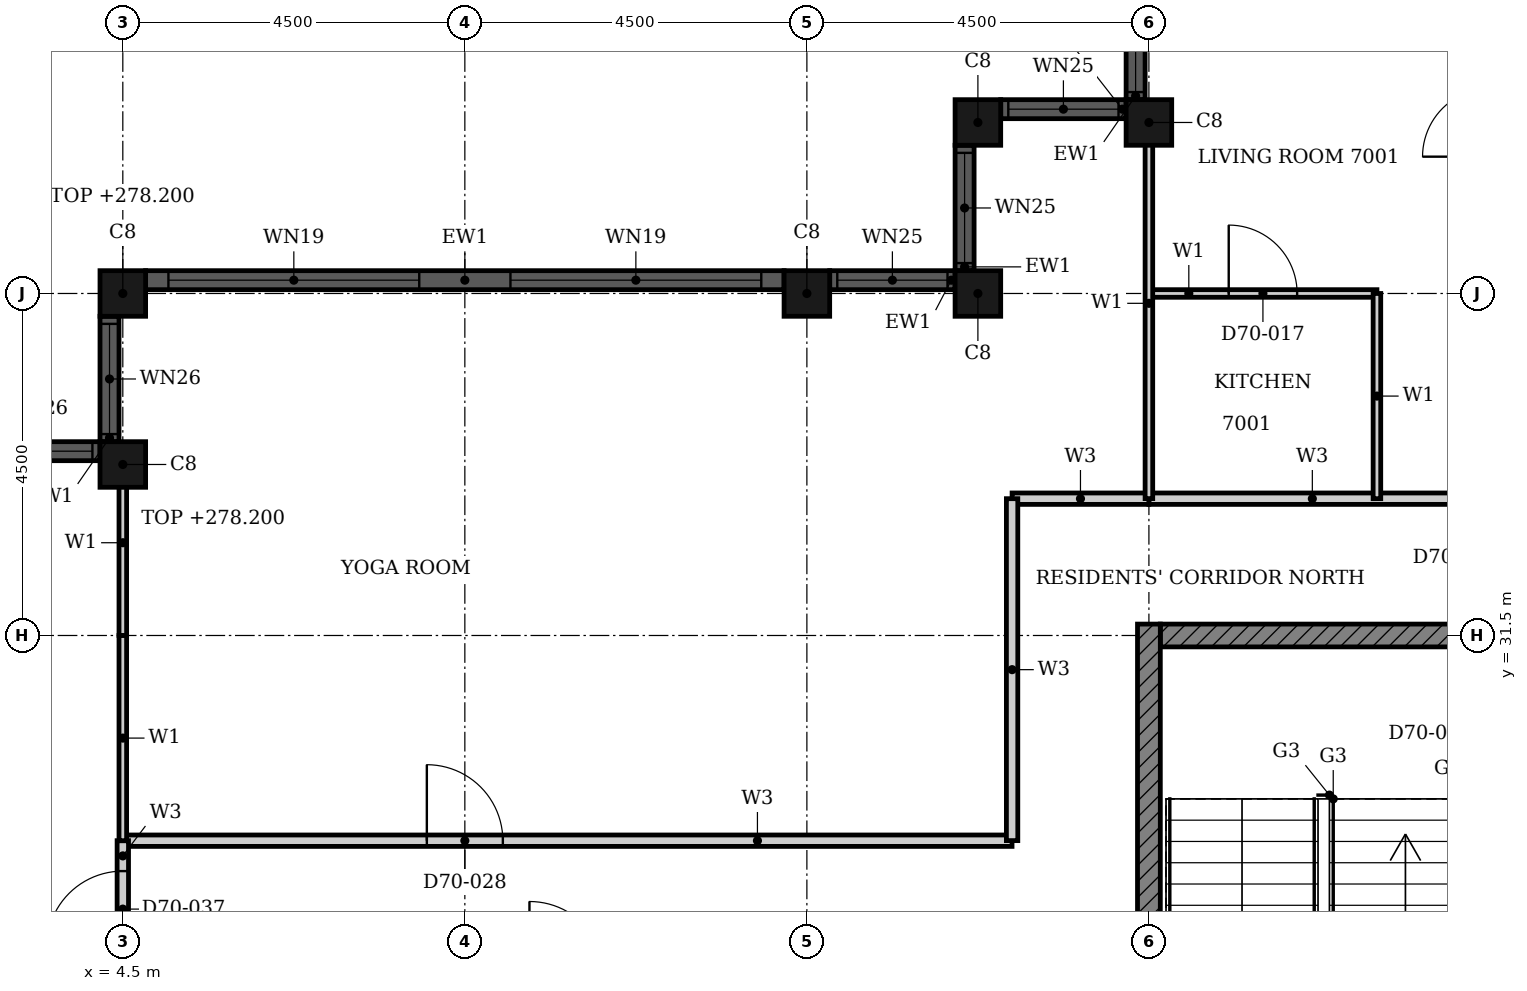
"""IFC4 building model, lengths in metres.
Left out: names, types, materials, properties, quantities, classifications, styles, units other than length and angle.
Written with IfcOpenShell. Run it as: python <this file> out.ifc"""

import sys

from ifc_helpers import new_model, si_unit, direction, frame, frame_2d, origin, origin_2d, place, context, subcontext, project, spatial, rectangle, hollow_rectangle, extrude, element, fill, save


model = new_model("IFC4")
c1 = context("Model", 3, precision=1e-05, world=origin(), true_north=direction((0.0, 1.0)))
c2 = subcontext(c1, "Body", "Model", "MODEL_VIEW")
j1 = project(units=[si_unit("LENGTHUNIT", "METRE"), si_unit("PLANEANGLEUNIT", "RADIAN")], contexts=[c1])
p1 = place(None, origin())
s1 = spatial("IfcSite", under=j1, at=p1, CompositionType="ELEMENT")
p2 = place(p1, origin())
s2 = spatial("IfcBuilding", under=s1, at=p2, CompositionType="ELEMENT")
p3 = place(p2, frame((0.0, 0.0, 274.9)))
s3 = spatial("IfcBuildingStorey", under=s2, at=p3, CompositionType="ELEMENT", Elevation=274.9)
for number, where, z_axis, x_axis in (
    (1, (18.0, 38.25, 0.0), (0.0, 0.0, 1.0), (1.0, 0.0, 0.0)),
    (2, (15.75, 38.25, 0.0), (0.0, 0.0, 1.0), (1.0, 0.0, 0.0)),
    (3, (15.75, 36.0, 0.0), (0.0, 0.0, 1.0), (1.0, 0.0, 0.0)),
    (4, (13.5, 36.0, 0.0), (0.0, 0.0, 1.0), (1.0, 0.0, 0.0)),
):
    element("IfcColumn", number, at=place(p3, frame(where, z_axis=z_axis, x_axis=x_axis)), inside=s3, PredefinedType="COLUMN", context=c2, shape_type="SweptSolid", body=[
        extrude(hollow_rectangle(XDim=0.6, YDim=0.6, WallThickness=0.02, at=origin_2d()), origin(), (0.0, 0.0, 1.0), 3.7),
    ])
for number, where, z_axis, x_axis in (
    (5, (4.5, 36.0, 0.0), (0.0, 0.0, 1.0), (1.0, 0.0, 0.0)),
    (6, (4.5, 33.75, 0.0), (0.0, 0.0, 1.0), (1.0, 0.0, 0.0)),
):
    element("IfcColumn", number, at=place(p3, frame(where, z_axis=z_axis, x_axis=x_axis)), inside=s3, PredefinedType="COLUMN", context=c2, shape_type="SweptSolid", body=[
        extrude(hollow_rectangle(XDim=0.6, YDim=0.6, WallThickness=0.02, at=origin_2d()), origin(), (0.0, 0.0, 1.0), 3.3),
    ])
p4 = place(p3, frame((17.825, 40.2, 0.0), z_axis=(0.0, 0.0, 1.0), x_axis=(0.0, -1.0, 0.0)))
e7 = element("IfcWall", 7, at=p4, inside=s3, PredefinedType="SOLIDWALL", context=c2, shape_type="SweptSolid", body=[
    extrude(rectangle(XDim=1.65, YDim=0.25, at=frame_2d((0.825, 0.0))), origin(), (0.0, 0.0, 1.0), 3.7),
])
p5 = place(p4, frame((0.1, 0.0, 0.9)))
e8 = element("IfcOpeningElement", 8, at=p5, cuts=e7, PredefinedType="OPENING", context=c2, shape_type="SweptSolid", body=[
    extrude(rectangle(XDim=1.45, YDim=1.85, at=frame_2d((0.725, 0.925))), frame((0.0, 0.135, 0.0), z_axis=(0.0, -1.0, 0.0), x_axis=(1.0, 0.0, 0.0)), (0.0, 0.0, 1.0), 0.27),
])
p6 = place(p3, frame((17.7, 38.425, 0.0), z_axis=(0.0, 0.0, 1.0), x_axis=(-1.0, 0.0, 0.0)))
e9 = element("IfcWall", 9, at=p6, inside=s3, PredefinedType="SOLIDWALL", context=c2, shape_type="SweptSolid", body=[
    extrude(rectangle(XDim=1.65, YDim=0.25, at=frame_2d((0.825, 0.0))), origin(), (0.0, 0.0, 1.0), 3.7),
])
p7 = place(p6, frame((0.1, 0.0, 0.9)))
e10 = element("IfcOpeningElement", 10, at=p7, cuts=e9, PredefinedType="OPENING", context=c2, shape_type="SweptSolid", body=[
    extrude(rectangle(XDim=1.45, YDim=1.85, at=frame_2d((0.725, 0.925))), frame((0.0, 0.135, 0.0), z_axis=(0.0, -1.0, 0.0), x_axis=(1.0, 0.0, 0.0)), (0.0, 0.0, 1.0), 0.27),
])
p8 = place(p3, frame((15.575, 37.95, 0.0), z_axis=(0.0, 0.0, 1.0), x_axis=(0.0, -1.0, 0.0)))
e11 = element("IfcWall", 11, at=p8, inside=s3, PredefinedType="SOLIDWALL", context=c2, shape_type="SweptSolid", body=[
    extrude(rectangle(XDim=1.65, YDim=0.25, at=frame_2d((0.825, 0.0))), origin(), (0.0, 0.0, 1.0), 3.7),
])
p9 = place(p8, frame((0.1, 0.0, 0.9)))
e12 = element("IfcOpeningElement", 12, at=p9, cuts=e11, PredefinedType="OPENING", context=c2, shape_type="SweptSolid", body=[
    extrude(rectangle(XDim=1.45, YDim=1.85, at=frame_2d((0.725, 0.925))), frame((0.0, 0.135, 0.0), z_axis=(0.0, -1.0, 0.0), x_axis=(1.0, 0.0, 0.0)), (0.0, 0.0, 1.0), 0.27),
])
p10 = place(p3, frame((15.45, 36.175, 0.0), z_axis=(0.0, 0.0, 1.0), x_axis=(-1.0, 0.0, 0.0)))
e13 = element("IfcWall", 13, at=p10, inside=s3, PredefinedType="SOLIDWALL", context=c2, shape_type="SweptSolid", body=[
    extrude(rectangle(XDim=1.65, YDim=0.25, at=frame_2d((0.825, 0.0))), origin(), (0.0, 0.0, 1.0), 3.7),
])
p11 = place(p10, frame((0.1, 0.0, 0.9)))
e14 = element("IfcOpeningElement", 14, at=p11, cuts=e13, PredefinedType="OPENING", context=c2, shape_type="SweptSolid", body=[
    extrude(rectangle(XDim=1.45, YDim=1.85, at=frame_2d((0.725, 0.925))), frame((0.0, 0.135, 0.0), z_axis=(0.0, -1.0, 0.0), x_axis=(1.0, 0.0, 0.0)), (0.0, 0.0, 1.0), 0.27),
])
p12 = place(p3, frame((13.2, 36.175, 0.0), z_axis=(0.0, 0.0, 1.0), x_axis=(-1.0, 0.0, 0.0)))
e15 = element("IfcWall", 15, at=p12, inside=s3, PredefinedType="SOLIDWALL", context=c2, shape_type="SweptSolid", body=[
    extrude(rectangle(XDim=8.4, YDim=0.25, at=frame_2d((4.2, 0.0))), origin(), (0.0, 0.0, 1.0), 3.7),
])
p13 = place(p12, frame((0.3, 0.0, 0.45)))
e16 = element("IfcOpeningElement", 16, at=p13, cuts=e15, PredefinedType="OPENING", context=c2, shape_type="SweptSolid", body=[
    extrude(rectangle(XDim=3.3, YDim=2.2, at=frame_2d((1.65, 1.1))), frame((0.0, 0.135, 0.0), z_axis=(0.0, -1.0, 0.0), x_axis=(1.0, 0.0, 0.0)), (0.0, 0.0, 1.0), 0.27),
])
p14 = place(p12, frame((4.8, 0.0, 0.45)))
e17 = element("IfcOpeningElement", 17, at=p14, cuts=e15, PredefinedType="OPENING", context=c2, shape_type="SweptSolid", body=[
    extrude(rectangle(XDim=3.3, YDim=2.2, at=frame_2d((1.65, 1.1))), frame((0.0, 0.135, 0.0), z_axis=(0.0, -1.0, 0.0), x_axis=(1.0, 0.0, 0.0)), (0.0, 0.0, 1.0), 0.27),
])
p15 = place(p3, frame((4.325, 35.7, 0.0), z_axis=(0.0, 0.0, 1.0), x_axis=(0.0, -1.0, 0.0)))
e18 = element("IfcWall", 18, at=p15, inside=s3, PredefinedType="SOLIDWALL", context=c2, shape_type="SweptSolid", body=[
    extrude(rectangle(XDim=1.65, YDim=0.25, at=frame_2d((0.825, 0.0))), origin(), (0.0, 0.0, 1.0), 3.7),
])
p16 = place(p15, frame((0.1, 0.0, 0.9)))
e19 = element("IfcOpeningElement", 19, at=p16, cuts=e18, PredefinedType="OPENING", context=c2, shape_type="SweptSolid", body=[
    extrude(rectangle(XDim=1.45, YDim=1.75, at=frame_2d((0.725, 0.875))), frame((0.0, 0.135, 0.0), z_axis=(0.0, -1.0, 0.0), x_axis=(1.0, 0.0, 0.0)), (0.0, 0.0, 1.0), 0.27),
])
p17 = place(p3, frame((4.2, 33.925, 0.0), z_axis=(0.0, 0.0, 1.0), x_axis=(-1.0, 0.0, 0.0)))
e20 = element("IfcWall", 20, at=p17, inside=s3, PredefinedType="SOLIDWALL", context=c2, shape_type="SweptSolid", body=[
    extrude(rectangle(XDim=1.65, YDim=0.25, at=frame_2d((0.825, 0.0))), origin(), (0.0, 0.0, 1.0), 3.7),
])
p18 = place(p17, frame((0.1, 0.0, 0.9)))
e21 = element("IfcOpeningElement", 21, at=p18, cuts=e20, PredefinedType="OPENING", context=c2, shape_type="SweptSolid", body=[
    extrude(rectangle(XDim=1.45, YDim=1.75, at=frame_2d((0.725, 0.875))), frame((0.0, 0.135, 0.0), z_axis=(0.0, -1.0, 0.0), x_axis=(1.0, 0.0, 0.0)), (0.0, 0.0, 1.0), 0.27),
])
p19 = place(p3, frame((18.15, 31.5, 0.0), z_axis=(0.0, 0.0, 1.0), x_axis=(1.0, 0.0, 0.0)))
e22 = element("IfcWall", 22, at=p19, inside=s3, PredefinedType="SHEAR", context=c2, shape_type="SweptSolid", body=[
    extrude(rectangle(XDim=9.368, YDim=0.3, at=frame_2d((4.684, 0.0))), origin(), (0.0, 0.0, 1.0), 3.3),
])
p20 = place(p19, frame((4.736, 0.0, 0.0)))
e23 = element("IfcOpeningElement", 23, at=p20, cuts=e22, PredefinedType="OPENING", context=c2, shape_type="SweptSolid", body=[
    extrude(rectangle(XDim=1.8, YDim=2.1, at=frame_2d((0.9, 1.05))), frame((0.0, 0.16, 0.0), z_axis=(0.0, -1.0, 0.0), x_axis=(1.0, 0.0, 0.0)), (0.0, 0.0, 1.0), 0.32),
])
p21 = place(p3, frame((18.0, 22.35, 0.0), z_axis=(0.0, 0.0, 1.0), x_axis=(0.0, 1.0, 0.0)))
e24 = element("IfcWall", 24, at=p21, inside=s3, PredefinedType="SHEAR", context=c2, shape_type="SweptSolid", body=[
    extrude(rectangle(XDim=9.3, YDim=0.3, at=frame_2d((4.65, 0.0))), origin(), (0.0, 0.0, 1.0), 3.3),
])
p22 = place(p3, frame((4.5, 28.8, 0.0), z_axis=(0.0, 0.0, 1.0), x_axis=(1.0, 0.0, 0.0)))
e25 = element("IfcWall", 25, at=p22, inside=s3, PredefinedType="PARTITIONING", context=c2, shape_type="SweptSolid", body=[
    extrude(rectangle(XDim=11.699, YDim=0.15, at=frame_2d((5.85, 0.0))), origin(), (0.0, 0.0, 1.0), 3.3),
])
p23 = place(p22, frame((4.0, 0.0, 0.0)))
e26 = element("IfcOpeningElement", 26, at=p23, cuts=e25, PredefinedType="OPENING", context=c2, shape_type="SweptSolid", body=[
    extrude(rectangle(XDim=1.0, YDim=2.1, at=frame_2d((0.5, 1.05))), frame((0.0, 0.085, 0.0), z_axis=(0.0, -1.0, 0.0), x_axis=(1.0, 0.0, 0.0)), (0.0, 0.0, 1.0), 0.17),
])
p24 = place(p3, frame((18.0, 33.3, 0.0), z_axis=(0.0, 0.0, 1.0), x_axis=(1.0, 0.0, 0.0)))
e27 = element("IfcWall", 27, at=p24, inside=s3, PredefinedType="PARTITIONING", context=c2, shape_type="SweptSolid", body=[
    extrude(rectangle(XDim=6.6, YDim=0.15, at=frame_2d((3.3, 0.0))), origin(), (0.0, 0.0, 1.0), 3.3),
])
p25 = place(p24, frame((4.3, 0.0, 0.0)))
e28 = element("IfcOpeningElement", 28, at=p25, cuts=e27, PredefinedType="OPENING", context=c2, shape_type="SweptSolid", body=[
    extrude(rectangle(XDim=1.0, YDim=2.2, at=frame_2d((0.5, 1.1))), frame((0.0, 0.085, 0.0), z_axis=(0.0, -1.0, 0.0), x_axis=(1.0, 0.0, 0.0)), (0.0, 0.0, 1.0), 0.17),
])
p26 = place(p3, frame((16.2, 33.3, 0.0), z_axis=(0.0, 0.0, 1.0), x_axis=(1.0, 0.0, 0.0)))
e29 = element("IfcWall", 29, at=p26, inside=s3, PredefinedType="PARTITIONING", context=c2, shape_type="SweptSolid", body=[
    extrude(rectangle(XDim=1.799, YDim=0.15, at=frame_2d((0.899, 0.0))), origin(), (0.0, 0.0, 1.0), 3.3),
])
p27 = place(p3, frame((16.2, 28.801, 0.0), z_axis=(0.0, 0.0, 1.0), x_axis=(0.0, 1.0, 0.0)))
e30 = element("IfcWall", 30, at=p27, inside=s3, PredefinedType="PARTITIONING", context=c2, shape_type="SweptSolid", body=[
    extrude(rectangle(XDim=4.499, YDim=0.15, at=frame_2d((2.25, 0.0))), origin(), (0.0, 0.0, 1.0), 3.3),
])
p28 = place(p3, frame((4.5, 27.0, 0.0), z_axis=(0.0, 0.0, 1.0), x_axis=(0.0, 1.0, 0.0)))
e31 = element("IfcWall", 31, at=p28, inside=s3, PredefinedType="PARTITIONING", context=c2, shape_type="SweptSolid", body=[
    extrude(rectangle(XDim=1.8, YDim=0.15, at=frame_2d((0.9, 0.0))), origin(), (0.0, 0.0, 1.0), 3.3),
])
p29 = place(p28, frame((0.4, 0.0, 0.0)))
e32 = element("IfcOpeningElement", 32, at=p29, cuts=e31, PredefinedType="OPENING", context=c2, shape_type="SweptSolid", body=[
    extrude(rectangle(XDim=1.0, YDim=2.1, at=frame_2d((0.5, 1.05))), frame((0.0, 0.085, 0.0), z_axis=(0.0, -1.0, 0.0), x_axis=(1.0, 0.0, 0.0)), (0.0, 0.0, 1.0), 0.17),
])
p30 = place(p3, frame((18.0, 36.0, 0.0), z_axis=(0.0, 0.0, 1.0), x_axis=(1.0, 0.0, 0.0)))
e33 = element("IfcWall", 33, at=p30, inside=s3, PredefinedType="PARTITIONING", context=c2, shape_type="SweptSolid", body=[
    extrude(rectangle(XDim=3.0, YDim=0.1, at=frame_2d((1.5, 0.0))), origin(), (0.0, 0.0, 1.0), 3.3),
])
p31 = place(p30, frame((1.05, 0.0, 0.0)))
e34 = element("IfcOpeningElement", 34, at=p31, cuts=e33, PredefinedType="OPENING", context=c2, shape_type="SweptSolid", body=[
    extrude(rectangle(XDim=0.9, YDim=2.1, at=frame_2d((0.45, 1.05))), frame((0.0, 0.06, 0.0), z_axis=(0.0, -1.0, 0.0), x_axis=(1.0, 0.0, 0.0)), (0.0, 0.0, 1.0), 0.12),
])
p32 = place(p3, frame((18.0, 33.301, 0.0), z_axis=(0.0, 0.0, 1.0), x_axis=(0.0, 1.0, 0.0)))
e35 = element("IfcWall", 35, at=p32, inside=s3, PredefinedType="PARTITIONING", context=c2, shape_type="SweptSolid", body=[
    extrude(rectangle(XDim=5.139, YDim=0.1, at=frame_2d((2.569, 0.0))), origin(), (0.0, 0.0, 1.0), 3.3),
])
for number, where, z_axis, x_axis in (
    (36, (21.0, 33.3, 0.0), (0.0, 0.0, 1.0), (0.0, 1.0, 0.0)),
    (37, (4.5, 28.8, 0.0), (0.0, 0.0, 1.0), (0.0, 1.0, 0.0)),
):
    element("IfcWall", number, at=place(p3, frame(where, z_axis=z_axis, x_axis=x_axis)), inside=s3, PredefinedType="PARTITIONING", context=c2, shape_type="SweptSolid", body=[
        extrude(rectangle(XDim=2.7, YDim=0.1, at=frame_2d((1.35, 0.0))), origin(), (0.0, 0.0, 1.0), 3.3),
    ])
p33 = place(p3, frame((4.5, 31.501, 0.0), z_axis=(0.0, 0.0, 1.0), x_axis=(0.0, 1.0, 0.0)))
e38 = element("IfcWall", 38, at=p33, inside=s3, PredefinedType="PARTITIONING", context=c2, shape_type="SweptSolid", body=[
    extrude(rectangle(XDim=2.439, YDim=0.1, at=frame_2d((1.219, 0.0))), origin(), (0.0, 0.0, 1.0), 3.3),
])
p34 = place(p5, origin())
e39 = element("IfcWindow", 39, at=p34, inside=s3, PartitioningType="SINGLE_PANEL", PredefinedType="WINDOW", context=c2, shape_type="SweptSolid", body=[
    extrude(rectangle(XDim=1.45, YDim=1.85, at=frame_2d((0.725, 0.925))), frame((0.0, 0.03, 0.0), z_axis=(0.0, -1.0, 0.0), x_axis=(1.0, 0.0, 0.0)), (0.0, 0.0, 1.0), 0.06),
])
fill(e8, e39)
p35 = place(p7, origin())
e40 = element("IfcWindow", 40, at=p35, inside=s3, PartitioningType="SINGLE_PANEL", PredefinedType="WINDOW", context=c2, shape_type="SweptSolid", body=[
    extrude(rectangle(XDim=1.45, YDim=1.85, at=frame_2d((0.725, 0.925))), frame((0.0, 0.03, 0.0), z_axis=(0.0, -1.0, 0.0), x_axis=(1.0, 0.0, 0.0)), (0.0, 0.0, 1.0), 0.06),
])
fill(e10, e40)
p36 = place(p9, origin())
e41 = element("IfcWindow", 41, at=p36, inside=s3, PartitioningType="SINGLE_PANEL", PredefinedType="WINDOW", context=c2, shape_type="SweptSolid", body=[
    extrude(rectangle(XDim=1.45, YDim=1.85, at=frame_2d((0.725, 0.925))), frame((0.0, 0.03, 0.0), z_axis=(0.0, -1.0, 0.0), x_axis=(1.0, 0.0, 0.0)), (0.0, 0.0, 1.0), 0.06),
])
fill(e12, e41)
p37 = place(p11, origin())
e42 = element("IfcWindow", 42, at=p37, inside=s3, PartitioningType="SINGLE_PANEL", PredefinedType="WINDOW", context=c2, shape_type="SweptSolid", body=[
    extrude(rectangle(XDim=1.45, YDim=1.85, at=frame_2d((0.725, 0.925))), frame((0.0, 0.03, 0.0), z_axis=(0.0, -1.0, 0.0), x_axis=(1.0, 0.0, 0.0)), (0.0, 0.0, 1.0), 0.06),
])
fill(e14, e42)
p38 = place(p13, origin())
e43 = element("IfcWindow", 43, at=p38, inside=s3, PartitioningType="SINGLE_PANEL", PredefinedType="WINDOW", context=c2, shape_type="SweptSolid", body=[
    extrude(rectangle(XDim=3.3, YDim=2.2, at=frame_2d((1.65, 1.1))), frame((0.0, 0.03, 0.0), z_axis=(0.0, -1.0, 0.0), x_axis=(1.0, 0.0, 0.0)), (0.0, 0.0, 1.0), 0.06),
])
fill(e16, e43)
p39 = place(p14, origin())
e44 = element("IfcWindow", 44, at=p39, inside=s3, PartitioningType="SINGLE_PANEL", PredefinedType="WINDOW", context=c2, shape_type="SweptSolid", body=[
    extrude(rectangle(XDim=3.3, YDim=2.2, at=frame_2d((1.65, 1.1))), frame((0.0, 0.03, 0.0), z_axis=(0.0, -1.0, 0.0), x_axis=(1.0, 0.0, 0.0)), (0.0, 0.0, 1.0), 0.06),
])
fill(e17, e44)
p40 = place(p16, origin())
e45 = element("IfcWindow", 45, at=p40, inside=s3, PartitioningType="SINGLE_PANEL", PredefinedType="WINDOW", context=c2, shape_type="SweptSolid", body=[
    extrude(rectangle(XDim=1.45, YDim=1.75, at=frame_2d((0.725, 0.875))), frame((0.0, 0.03, 0.0), z_axis=(0.0, -1.0, 0.0), x_axis=(1.0, 0.0, 0.0)), (0.0, 0.0, 1.0), 0.06),
])
fill(e19, e45)
p41 = place(p18, origin())
e46 = element("IfcWindow", 46, at=p41, inside=s3, PartitioningType="SINGLE_PANEL", PredefinedType="WINDOW", context=c2, shape_type="SweptSolid", body=[
    extrude(rectangle(XDim=1.45, YDim=1.75, at=frame_2d((0.725, 0.875))), frame((0.0, 0.03, 0.0), z_axis=(0.0, -1.0, 0.0), x_axis=(1.0, 0.0, 0.0)), (0.0, 0.0, 1.0), 0.06),
])
fill(e21, e46)
p42 = place(p31, origin())
e47 = element("IfcDoor", 47, at=p42, inside=s3, OperationType="SINGLE_SWING_RIGHT", PredefinedType="DOOR", context=c2, shape_type="SweptSolid", body=[
    extrude(rectangle(XDim=0.9, YDim=2.1, at=frame_2d((0.45, 1.05))), frame((0.0, 0.025, 0.0), z_axis=(0.0, -1.0, 0.0), x_axis=(1.0, 0.0, 0.0)), (0.0, 0.0, 1.0), 0.05),
])
fill(e34, e47)
p43 = place(p23, origin())
e48 = element("IfcDoor", 48, at=p43, inside=s3, OperationType="SINGLE_SWING_RIGHT", PredefinedType="DOOR", context=c2, shape_type="SweptSolid", body=[
    extrude(rectangle(XDim=1.0, YDim=2.1, at=frame_2d((0.5, 1.05))), frame((0.0, 0.025, 0.0), z_axis=(0.0, -1.0, 0.0), x_axis=(1.0, 0.0, 0.0)), (0.0, 0.0, 1.0), 0.05),
])
fill(e26, e48)
p44 = place(p29, origin())
e49 = element("IfcDoor", 49, at=p44, inside=s3, OperationType="SINGLE_SWING_RIGHT", PredefinedType="DOOR", context=c2, shape_type="SweptSolid", body=[
    extrude(rectangle(XDim=1.0, YDim=2.1, at=frame_2d((0.5, 1.05))), frame((0.0, 0.025, 0.0), z_axis=(0.0, -1.0, 0.0), x_axis=(1.0, 0.0, 0.0)), (0.0, 0.0, 1.0), 0.05),
])
fill(e32, e49)
save(model, sys.argv[1])
